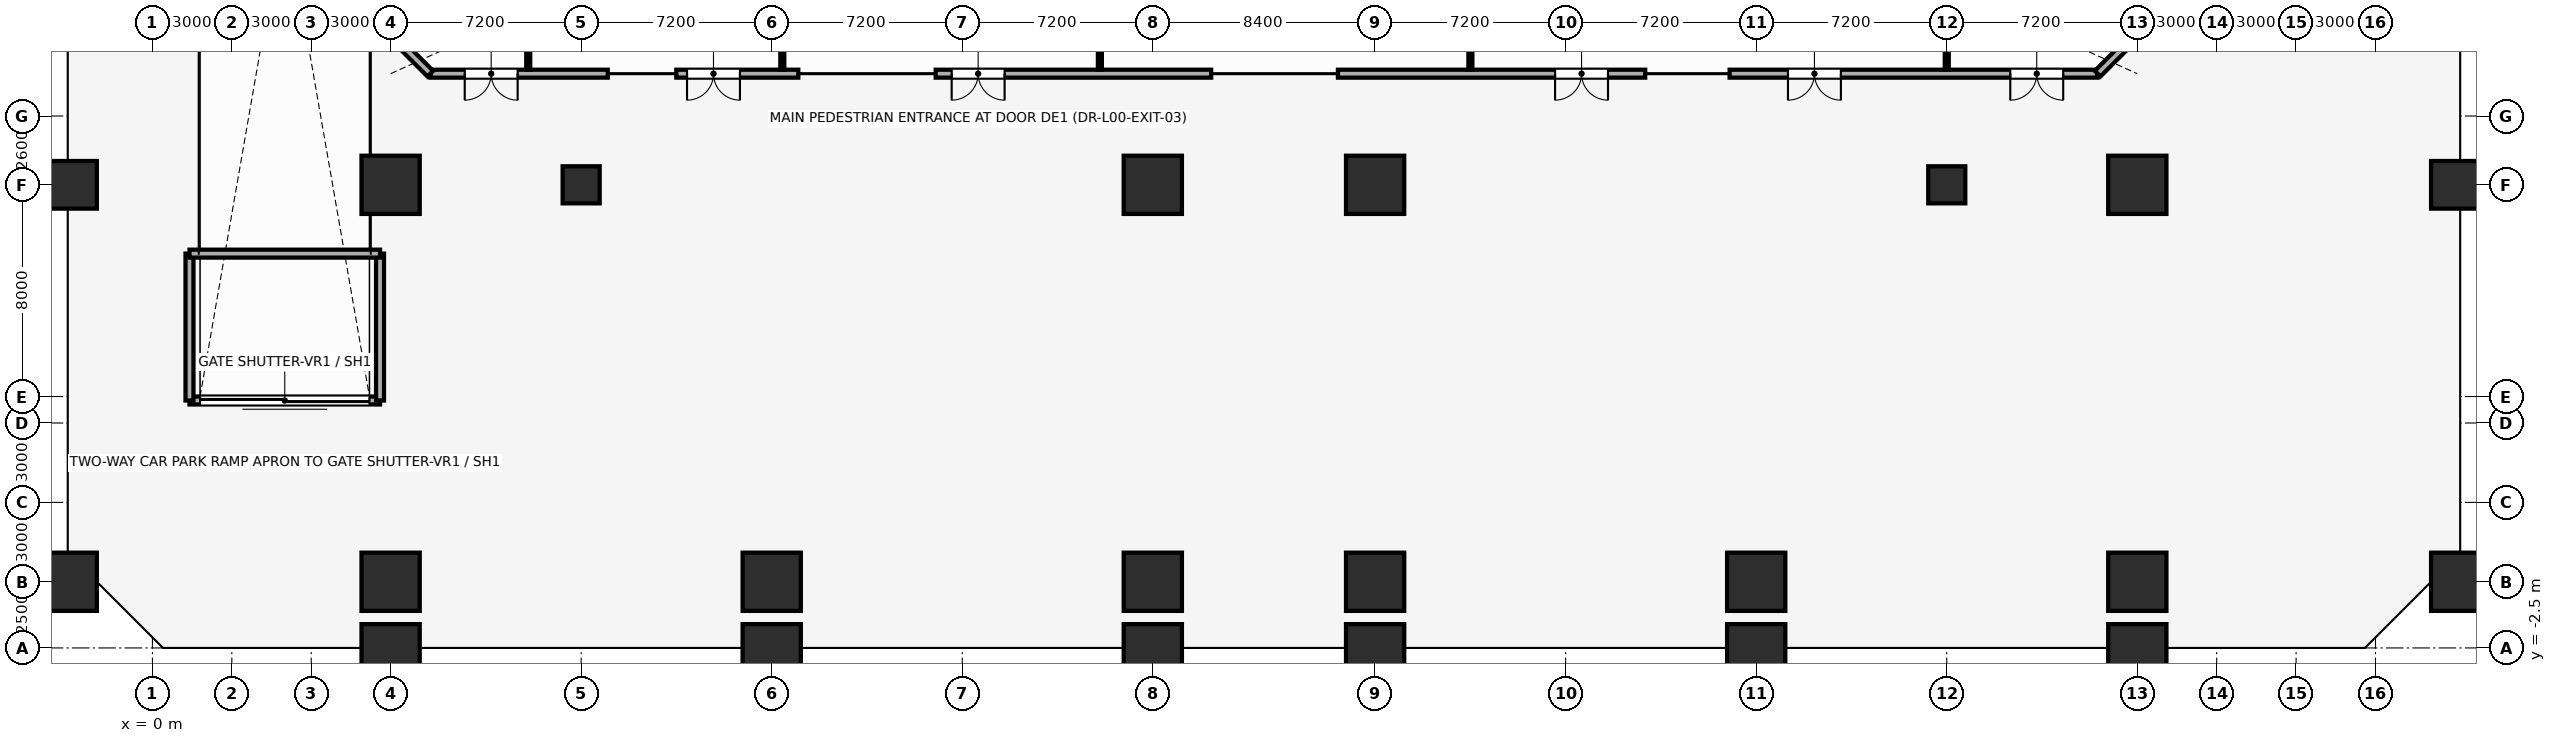
"""IFC4 building model, lengths in metres.
Left out: names, types, materials, properties, quantities, classifications, styles, units other than length and angle.
Written with IfcOpenShell. Run it as: python <this file> out.ifc"""

import sys

from ifc_helpers import new_model, si_unit, direction, frame, frame_2d, origin, origin_2d, place, context, subcontext, project, spatial, rectangle, circle, extrude, element, fill, save


model = new_model("IFC4")
c1 = context("Model", 3, precision=1e-05, world=origin(), true_north=direction((0.0, 1.0)))
c2 = subcontext(c1, "Body", "Model", "MODEL_VIEW")
j1 = project(units=[si_unit("LENGTHUNIT", "METRE"), si_unit("PLANEANGLEUNIT", "RADIAN")], contexts=[c1])
p1 = place(None, origin())
s1 = spatial("IfcSite", under=j1, at=p1, CompositionType="ELEMENT")
p2 = place(p1, origin())
s2 = spatial("IfcBuilding", under=s1, at=p2, CompositionType="ELEMENT")
p3 = place(p2, origin())
s3 = spatial("IfcBuildingStorey", under=s2, at=p3, CompositionType="ELEMENT", Elevation=0.0)
for number, where, z_axis, x_axis in (
    (1, (-3.2, 0.0, 0.0), (0.0, 0.0, 1.0), (1.0, 0.0, 0.0)),
    (2, (9.0, 0.0, 0.0), (0.0, 0.0, 1.0), (1.0, 0.0, 0.0)),
):
    element("IfcColumn", number, at=place(p3, frame(where, z_axis=z_axis, x_axis=x_axis)), inside=s3, PredefinedType="USERDEFINED", context=c2, shape_type="SweptSolid", body=[
        extrude(circle(Radius=1.1, at=origin_2d()), origin(), (0.0, 0.0, 1.0), 7.68),
    ])
p4 = place(p3, frame((9.0, -2.5, 0.0), z_axis=(0.0, 0.0, 1.0), x_axis=(1.0, 0.0, 0.0)))
e3 = element("IfcColumn", 3, at=p4, inside=s3, PredefinedType="USERDEFINED", context=c2, shape_type="SweptSolid", body=[
    extrude(rectangle(XDim=2.2, YDim=1.8, at=origin_2d()), origin(), (0.0, 0.0, 1.0), 7.68),
])
p5 = place(p3, frame((23.4, 0.0, 0.0), z_axis=(0.0, 0.0, 1.0), x_axis=(1.0, 0.0, 0.0)))
e4 = element("IfcColumn", 4, at=p5, inside=s3, PredefinedType="USERDEFINED", context=c2, shape_type="SweptSolid", body=[
    extrude(circle(Radius=1.1, at=origin_2d()), origin(), (0.0, 0.0, 1.0), 7.68),
])
p6 = place(p3, frame((23.4, -2.5, 0.0), z_axis=(0.0, 0.0, 1.0), x_axis=(1.0, 0.0, 0.0)))
e5 = element("IfcColumn", 5, at=p6, inside=s3, PredefinedType="USERDEFINED", context=c2, shape_type="SweptSolid", body=[
    extrude(rectangle(XDim=2.2, YDim=1.8, at=origin_2d()), origin(), (0.0, 0.0, 1.0), 7.68),
])
p7 = place(p3, frame((37.8, 0.0, 0.0), z_axis=(0.0, 0.0, 1.0), x_axis=(1.0, 0.0, 0.0)))
e6 = element("IfcColumn", 6, at=p7, inside=s3, PredefinedType="USERDEFINED", context=c2, shape_type="SweptSolid", body=[
    extrude(circle(Radius=1.1, at=origin_2d()), origin(), (0.0, 0.0, 1.0), 7.68),
])
p8 = place(p3, frame((37.8, -2.5, 0.0), z_axis=(0.0, 0.0, 1.0), x_axis=(1.0, 0.0, 0.0)))
e7 = element("IfcColumn", 7, at=p8, inside=s3, PredefinedType="USERDEFINED", context=c2, shape_type="SweptSolid", body=[
    extrude(rectangle(XDim=2.2, YDim=1.8, at=origin_2d()), origin(), (0.0, 0.0, 1.0), 7.68),
])
p9 = place(p3, frame((46.2, 0.0, 0.0), z_axis=(0.0, 0.0, 1.0), x_axis=(1.0, 0.0, 0.0)))
e8 = element("IfcColumn", 8, at=p9, inside=s3, PredefinedType="USERDEFINED", context=c2, shape_type="SweptSolid", body=[
    extrude(circle(Radius=1.1, at=origin_2d()), origin(), (0.0, 0.0, 1.0), 7.68),
])
p10 = place(p3, frame((46.2, -2.5, 0.0), z_axis=(0.0, 0.0, 1.0), x_axis=(1.0, 0.0, 0.0)))
e9 = element("IfcColumn", 9, at=p10, inside=s3, PredefinedType="USERDEFINED", context=c2, shape_type="SweptSolid", body=[
    extrude(rectangle(XDim=2.2, YDim=1.8, at=origin_2d()), origin(), (0.0, 0.0, 1.0), 7.68),
])
p11 = place(p3, frame((60.6, 0.0, 0.0), z_axis=(0.0, 0.0, 1.0), x_axis=(1.0, 0.0, 0.0)))
e10 = element("IfcColumn", 10, at=p11, inside=s3, PredefinedType="USERDEFINED", context=c2, shape_type="SweptSolid", body=[
    extrude(circle(Radius=1.1, at=origin_2d()), origin(), (0.0, 0.0, 1.0), 7.68),
])
p12 = place(p3, frame((60.6, -2.5, 0.0), z_axis=(0.0, 0.0, 1.0), x_axis=(1.0, 0.0, 0.0)))
e11 = element("IfcColumn", 11, at=p12, inside=s3, PredefinedType="USERDEFINED", context=c2, shape_type="SweptSolid", body=[
    extrude(rectangle(XDim=2.2, YDim=1.8, at=origin_2d()), origin(), (0.0, 0.0, 1.0), 7.68),
])
p13 = place(p3, frame((75.0, 0.0, 0.0), z_axis=(0.0, 0.0, 1.0), x_axis=(1.0, 0.0, 0.0)))
e12 = element("IfcColumn", 12, at=p13, inside=s3, PredefinedType="USERDEFINED", context=c2, shape_type="SweptSolid", body=[
    extrude(circle(Radius=1.1, at=origin_2d()), origin(), (0.0, 0.0, 1.0), 7.68),
])
p14 = place(p3, frame((75.0, -2.5, 0.0), z_axis=(0.0, 0.0, 1.0), x_axis=(1.0, 0.0, 0.0)))
e13 = element("IfcColumn", 13, at=p14, inside=s3, PredefinedType="USERDEFINED", context=c2, shape_type="SweptSolid", body=[
    extrude(rectangle(XDim=2.2, YDim=1.8, at=origin_2d()), origin(), (0.0, 0.0, 1.0), 7.68),
])
p15 = place(p3, frame((87.2, 0.0, 0.0), z_axis=(0.0, 0.0, 1.0), x_axis=(1.0, 0.0, 0.0)))
e14 = element("IfcColumn", 14, at=p15, inside=s3, PredefinedType="USERDEFINED", context=c2, shape_type="SweptSolid", body=[
    extrude(circle(Radius=1.1, at=origin_2d()), origin(), (0.0, 0.0, 1.0), 7.68),
])
for number, where, z_axis, x_axis in (
    (15, (-3.2, 15.0, 0.0), (0.0, 0.0, 1.0), (1.0, 0.0, 0.0)),
    (16, (87.2, 15.0, 0.0), (0.0, 0.0, 1.0), (1.0, 0.0, 0.0)),
):
    element("IfcColumn", number, at=place(p3, frame(where, z_axis=z_axis, x_axis=x_axis)), inside=s3, PredefinedType="USERDEFINED", context=c2, shape_type="SweptSolid", body=[
        extrude(rectangle(XDim=2.2, YDim=1.8, at=origin_2d()), origin(), (0.0, 0.0, 1.0), 7.68),
    ])
for number, where, z_axis, x_axis in (
    (17, (9.0, 15.0, 0.0), (0.0, 0.0, 1.0), (1.0, 0.0, 0.0)),
    (18, (37.8, 15.0, 0.0), (0.0, 0.0, 1.0), (1.0, 0.0, 0.0)),
    (19, (46.2, 15.0, 0.0), (0.0, 0.0, 1.0), (1.0, 0.0, 0.0)),
    (20, (75.0, 15.0, 0.0), (0.0, 0.0, 1.0), (1.0, 0.0, 0.0)),
):
    element("IfcColumn", number, at=place(p3, frame(where, z_axis=z_axis, x_axis=x_axis)), inside=s3, PredefinedType="USERDEFINED", context=c2, shape_type="SweptSolid", body=[
        extrude(circle(Radius=1.1, at=origin_2d()), origin(), (0.0, 0.0, 1.0), 7.68),
    ])
for number, where, z_axis, x_axis in (
    (21, (16.2, 15.0, 0.0), (0.0, 0.0, 1.0), (1.0, 0.0, 0.0)),
    (22, (67.8, 15.0, 0.0), (0.0, 0.0, 1.0), (1.0, 0.0, 0.0)),
):
    element("IfcColumn", number, at=place(p3, frame(where, z_axis=z_axis, x_axis=x_axis)), inside=s3, PredefinedType="COLUMN", context=c2, shape_type="SweptSolid", body=[
        extrude(rectangle(XDim=1.4, YDim=1.4, at=origin_2d()), origin(), (0.0, 0.0, 1.0), 7.68),
    ])
p16 = place(p3, frame((73.5, 19.2, 0.0), z_axis=(0.0, 0.0, 1.0), x_axis=(-1.0, 0.0, 0.0)))
e23 = element("IfcWall", 23, at=p16, inside=s3, PredefinedType="SOLIDWALL", context=c2, shape_type="SweptSolid", body=[
    extrude(rectangle(XDim=13.905, YDim=0.3, at=frame_2d((6.953, 0.0))), origin(), (0.0, 0.0, 1.0), 7.68),
])
p17 = place(p16, frame((9.7, 0.0, 0.0)))
e24 = element("IfcOpeningElement", 24, at=p17, cuts=e23, PredefinedType="OPENING", context=c2, shape_type="SweptSolid", body=[
    extrude(rectangle(XDim=2.0, YDim=2.4, at=frame_2d((1.0, 1.2))), frame((0.0, 0.16, 0.0), z_axis=(0.0, -1.0, 0.0), x_axis=(1.0, 0.0, 0.0)), (0.0, 0.0, 1.0), 0.32),
])
p18 = place(p16, frame((1.3, 0.0, 0.0)))
e25 = element("IfcOpeningElement", 25, at=p18, cuts=e23, PredefinedType="OPENING", context=c2, shape_type="SweptSolid", body=[
    extrude(rectangle(XDim=2.0, YDim=2.4, at=frame_2d((1.0, 1.2))), frame((0.0, 0.16, 0.0), z_axis=(0.0, -1.0, 0.0), x_axis=(1.0, 0.0, 0.0)), (0.0, 0.0, 1.0), 0.32),
])
p19 = place(p3, frame((56.405, 19.2, 0.0), z_axis=(0.0, 0.0, 1.0), x_axis=(-1.0, 0.0, 0.0)))
e26 = element("IfcWall", 26, at=p19, inside=s3, PredefinedType="SOLIDWALL", context=c2, shape_type="SweptSolid", body=[
    extrude(rectangle(XDim=11.61, YDim=0.3, at=frame_2d((5.805, 0.0))), origin(), (0.0, 0.0, 1.0), 7.68),
])
p20 = place(p19, frame((1.405, 0.0, 0.0)))
e27 = element("IfcOpeningElement", 27, at=p20, cuts=e26, PredefinedType="OPENING", context=c2, shape_type="SweptSolid", body=[
    extrude(rectangle(XDim=2.0, YDim=2.4, at=frame_2d((1.0, 1.2))), frame((0.0, 0.16, 0.0), z_axis=(0.0, -1.0, 0.0), x_axis=(1.0, 0.0, 0.0)), (0.0, 0.0, 1.0), 0.32),
])
p21 = place(p3, frame((40.005, 19.2, 0.0), z_axis=(0.0, 0.0, 1.0), x_axis=(-1.0, 0.0, 0.0)))
e28 = element("IfcWall", 28, at=p21, inside=s3, PredefinedType="SOLIDWALL", context=c2, shape_type="SweptSolid", body=[
    extrude(rectangle(XDim=10.41, YDim=0.3, at=frame_2d((5.205, 0.0))), origin(), (0.0, 0.0, 1.0), 7.68),
])
p22 = place(p21, frame((7.805, 0.0, 0.0)))
e29 = element("IfcOpeningElement", 29, at=p22, cuts=e28, PredefinedType="OPENING", context=c2, shape_type="SweptSolid", body=[
    extrude(rectangle(XDim=2.0, YDim=2.4, at=frame_2d((1.0, 1.2))), frame((0.0, 0.16, 0.0), z_axis=(0.0, -1.0, 0.0), x_axis=(1.0, 0.0, 0.0)), (0.0, 0.0, 1.0), 0.32),
])
p23 = place(p3, frame((24.405, 19.2, 0.0), z_axis=(0.0, 0.0, 1.0), x_axis=(-1.0, 0.0, 0.0)))
e30 = element("IfcWall", 30, at=p23, inside=s3, PredefinedType="SOLIDWALL", context=c2, shape_type="SweptSolid", body=[
    extrude(rectangle(XDim=4.61, YDim=0.3, at=frame_2d((2.305, 0.0))), origin(), (0.0, 0.0, 1.0), 7.68),
])
p24 = place(p23, frame((2.205, 0.0, 0.0)))
e31 = element("IfcOpeningElement", 31, at=p24, cuts=e30, PredefinedType="OPENING", context=c2, shape_type="SweptSolid", body=[
    extrude(rectangle(XDim=2.0, YDim=2.4, at=frame_2d((1.0, 1.2))), frame((0.0, 0.16, 0.0), z_axis=(0.0, -1.0, 0.0), x_axis=(1.0, 0.0, 0.0)), (0.0, 0.0, 1.0), 0.32),
])
p25 = place(p3, frame((17.205, 19.2, 0.0), z_axis=(0.0, 0.0, 1.0), x_axis=(-1.0, 0.0, 0.0)))
e32 = element("IfcWall", 32, at=p25, inside=s3, PredefinedType="SOLIDWALL", context=c2, shape_type="SweptSolid", body=[
    extrude(rectangle(XDim=6.705, YDim=0.3, at=frame_2d((3.353, 0.0))), origin(), (0.0, 0.0, 1.0), 7.68),
])
p26 = place(p25, frame((3.405, 0.0, 0.0)))
e33 = element("IfcOpeningElement", 33, at=p26, cuts=e32, PredefinedType="OPENING", context=c2, shape_type="SweptSolid", body=[
    extrude(rectangle(XDim=2.0, YDim=2.4, at=frame_2d((1.0, 1.2))), frame((0.0, 0.16, 0.0), z_axis=(0.0, -1.0, 0.0), x_axis=(1.0, 0.0, 0.0)), (0.0, 0.0, 1.0), 0.32),
])
for number, where, z_axis, x_axis in (
    (34, (73.5, 19.2, 0.0), (0.0, 0.0, 1.0), (0.707, 0.707, 0.0)),
    (35, (9.0, 20.7, 0.0), (0.0, 0.0, 1.0), (0.707, -0.707, 0.0)),
):
    element("IfcWall", number, at=place(p3, frame(where, z_axis=z_axis, x_axis=x_axis)), inside=s3, PredefinedType="SOLIDWALL", context=c2, shape_type="SweptSolid", body=[
        extrude(rectangle(XDim=2.121, YDim=0.3, at=frame_2d((1.061, 0.0))), origin(), (0.0, 0.0, 1.0), 7.68),
    ])
p27 = place(p3, frame((8.6, 6.85, 0.0), z_axis=(0.0, 0.0, 1.0), x_axis=(-1.0, 0.0, 0.0)))
e36 = element("IfcWall", 36, at=p27, inside=s3, PredefinedType="SOLIDWALL", context=c2, shape_type="SweptSolid", body=[
    extrude(rectangle(XDim=7.2, YDim=0.3, at=frame_2d((3.6, 0.0))), origin(), (0.0, 0.0, 1.0), 5.2),
])
p28 = place(p27, frame((0.4, 0.0, 0.0)))
e37 = element("IfcOpeningElement", 37, at=p28, cuts=e36, PredefinedType="OPENING", context=c2, shape_type="SweptSolid", body=[
    extrude(rectangle(XDim=6.4, YDim=3.6, at=frame_2d((3.2, 1.8))), frame((0.0, 0.16, 0.0), z_axis=(0.0, -1.0, 0.0), x_axis=(1.0, 0.0, 0.0)), (0.0, 0.0, 1.0), 0.32),
])
for number, where, z_axis, x_axis in (
    (38, (1.4, 12.4, 0.0), (0.0, 0.0, 1.0), (0.0, -1.0, 0.0)),
    (39, (8.6, 6.85, 0.0), (0.0, 0.0, 1.0), (0.0, 1.0, 0.0)),
):
    element("IfcWall", number, at=place(p3, frame(where, z_axis=z_axis, x_axis=x_axis)), inside=s3, PredefinedType="SOLIDWALL", context=c2, shape_type="SweptSolid", body=[
        extrude(rectangle(XDim=5.55, YDim=0.3, at=frame_2d((2.775, 0.0))), origin(), (0.0, 0.0, 1.0), 5.2),
    ])
p29 = place(p3, frame((1.4, 12.4, 0.0), z_axis=(0.0, 0.0, 1.0), x_axis=(1.0, 0.0, 0.0)))
e40 = element("IfcWall", 40, at=p29, inside=s3, PredefinedType="SOLIDWALL", context=c2, shape_type="SweptSolid", body=[
    extrude(rectangle(XDim=7.2, YDim=0.3, at=frame_2d((3.6, 0.0))), origin(), (0.0, 0.0, 1.0), 5.2),
])
p30 = place(p3, frame((14.2, 19.355, 0.0), z_axis=(0.0, 0.0, 1.0), x_axis=(0.0, 1.0, 0.0)))
e41 = element("IfcWall", 41, at=p30, inside=s3, PredefinedType="PARTITIONING", context=c2, shape_type="SweptSolid", body=[
    extrude(rectangle(XDim=7.365, YDim=0.15, at=frame_2d((3.683, 0.0))), origin(), (0.0, 0.0, 1.0), 7.68),
])
p31 = place(p3, frame((23.8, 19.355, 0.0), z_axis=(0.0, 0.0, 1.0), x_axis=(0.0, 1.0, 0.0)))
e42 = element("IfcWall", 42, at=p31, inside=s3, PredefinedType="PARTITIONING", context=c2, shape_type="SweptSolid", body=[
    extrude(rectangle(XDim=7.365, YDim=0.15, at=frame_2d((3.683, 0.0))), origin(), (0.0, 0.0, 1.0), 5.4),
])
for number, where, z_axis, x_axis in (
    (43, (35.8, 19.355, 0.0), (0.0, 0.0, 1.0), (0.0, 1.0, 0.0)),
    (44, (49.8, 19.355, 0.0), (0.0, 0.0, 1.0), (0.0, 1.0, 0.0)),
    (45, (67.8, 19.355, 0.0), (0.0, 0.0, 1.0), (0.0, 1.0, 0.0)),
):
    element("IfcWall", number, at=place(p3, frame(where, z_axis=z_axis, x_axis=x_axis)), inside=s3, PredefinedType="PARTITIONING", context=c2, shape_type="SweptSolid", body=[
        extrude(rectangle(XDim=7.365, YDim=0.15, at=frame_2d((3.683, 0.0))), origin(), (0.0, 0.0, 1.0), 7.68),
    ])
p32 = place(p26, origin())
e46 = element("IfcDoor", 46, at=p32, inside=s3, OperationType="DOUBLE_DOOR_SINGLE_SWING", PredefinedType="DOOR", context=c2, shape_type="SweptSolid", body=[
    extrude(rectangle(XDim=2.0, YDim=2.4, at=frame_2d((1.0, 1.2))), frame((0.0, 0.025, 0.0), z_axis=(0.0, -1.0, 0.0), x_axis=(1.0, 0.0, 0.0)), (0.0, 0.0, 1.0), 0.05),
])
fill(e33, e46)
p33 = place(p24, origin())
e47 = element("IfcDoor", 47, at=p33, inside=s3, OperationType="DOUBLE_DOOR_SINGLE_SWING", PredefinedType="DOOR", context=c2, shape_type="SweptSolid", body=[
    extrude(rectangle(XDim=2.0, YDim=2.4, at=frame_2d((1.0, 1.2))), frame((0.0, 0.025, 0.0), z_axis=(0.0, -1.0, 0.0), x_axis=(1.0, 0.0, 0.0)), (0.0, 0.0, 1.0), 0.05),
])
fill(e31, e47)
p34 = place(p22, origin())
e48 = element("IfcDoor", 48, at=p34, inside=s3, OperationType="DOUBLE_DOOR_SINGLE_SWING", PredefinedType="DOOR", context=c2, shape_type="SweptSolid", body=[
    extrude(rectangle(XDim=2.0, YDim=2.4, at=frame_2d((1.0, 1.2))), frame((0.0, 0.025, 0.0), z_axis=(0.0, -1.0, 0.0), x_axis=(1.0, 0.0, 0.0)), (0.0, 0.0, 1.0), 0.05),
])
fill(e29, e48)
p35 = place(p20, origin())
e49 = element("IfcDoor", 49, at=p35, inside=s3, OperationType="DOUBLE_DOOR_SINGLE_SWING", PredefinedType="DOOR", context=c2, shape_type="SweptSolid", body=[
    extrude(rectangle(XDim=2.0, YDim=2.4, at=frame_2d((1.0, 1.2))), frame((0.0, 0.025, 0.0), z_axis=(0.0, -1.0, 0.0), x_axis=(1.0, 0.0, 0.0)), (0.0, 0.0, 1.0), 0.05),
])
fill(e27, e49)
p36 = place(p17, origin())
e50 = element("IfcDoor", 50, at=p36, inside=s3, OperationType="DOUBLE_DOOR_SINGLE_SWING", PredefinedType="DOOR", context=c2, shape_type="SweptSolid", body=[
    extrude(rectangle(XDim=2.0, YDim=2.4, at=frame_2d((1.0, 1.2))), frame((0.0, 0.025, 0.0), z_axis=(0.0, -1.0, 0.0), x_axis=(1.0, 0.0, 0.0)), (0.0, 0.0, 1.0), 0.05),
])
fill(e24, e50)
p37 = place(p18, origin())
e51 = element("IfcDoor", 51, at=p37, inside=s3, OperationType="DOUBLE_DOOR_SINGLE_SWING", PredefinedType="DOOR", context=c2, shape_type="SweptSolid", body=[
    extrude(rectangle(XDim=2.0, YDim=2.4, at=frame_2d((1.0, 1.2))), frame((0.0, 0.025, 0.0), z_axis=(0.0, -1.0, 0.0), x_axis=(1.0, 0.0, 0.0)), (0.0, 0.0, 1.0), 0.05),
])
fill(e25, e51)
p38 = place(p28, origin())
e52 = element("IfcDoor", 52, at=p38, inside=s3, OperationType="SINGLE_SWING_LEFT", PredefinedType="GATE", context=c2, shape_type="SweptSolid", body=[
    extrude(rectangle(XDim=6.4, YDim=3.6, at=frame_2d((3.2, 1.8))), frame((0.0, 0.025, 0.0), z_axis=(0.0, -1.0, 0.0), x_axis=(1.0, 0.0, 0.0)), (0.0, 0.0, 1.0), 0.05),
])
fill(e37, e52)
save(model, sys.argv[1])
